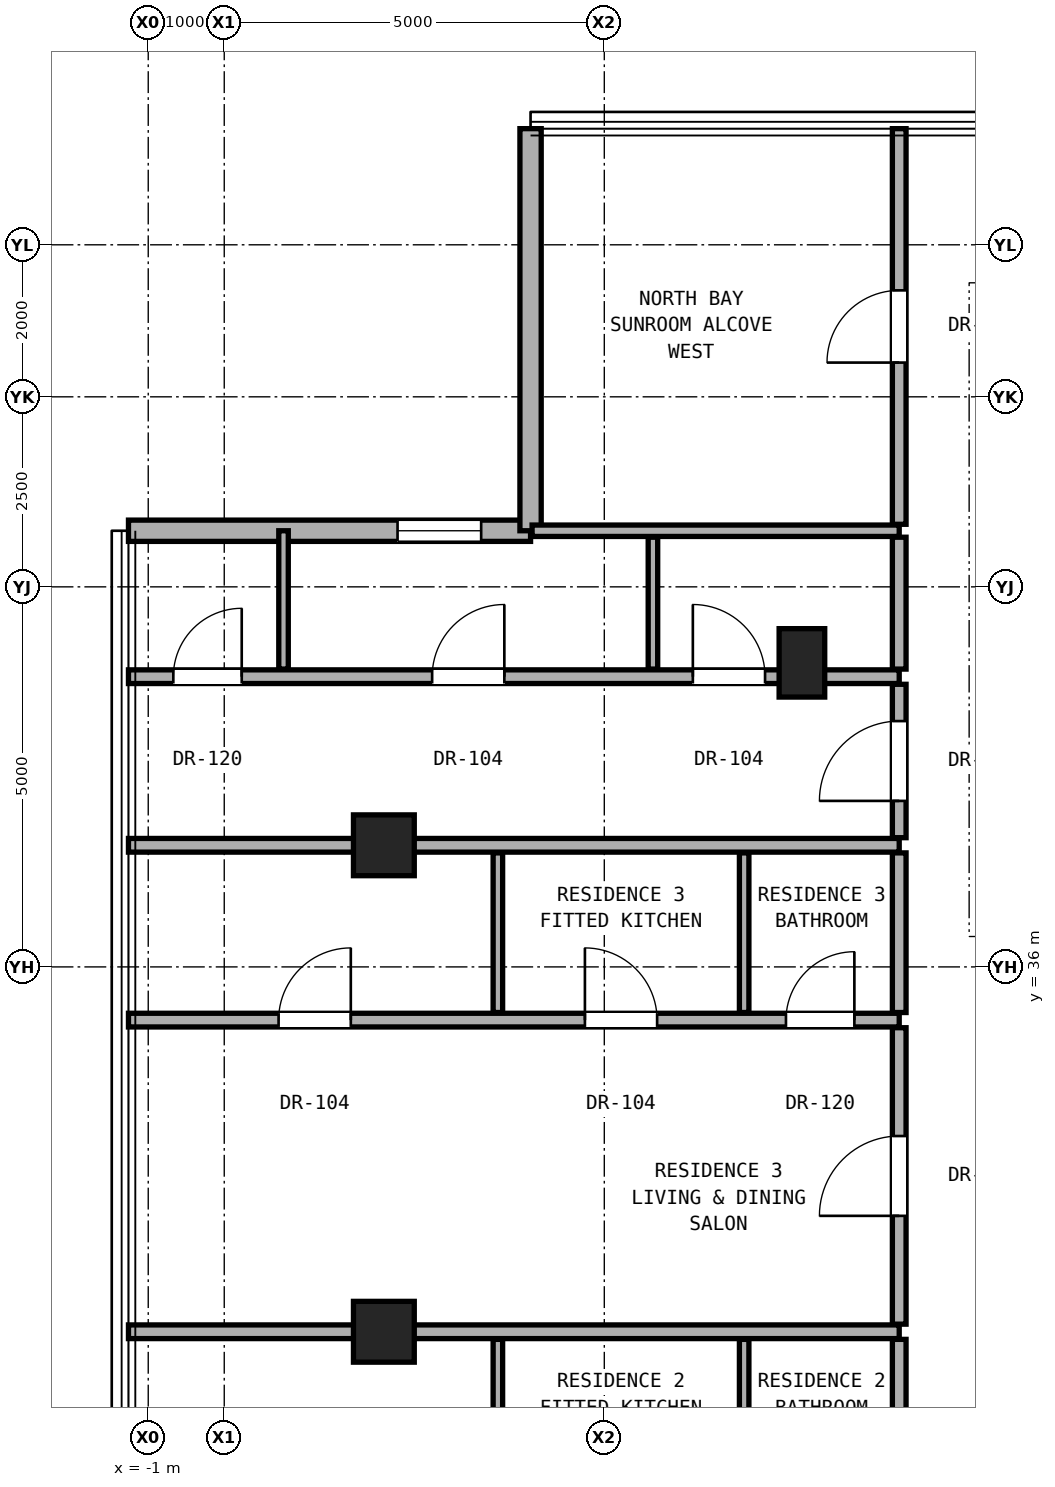
"""IFC4 building model, lengths in metres.
Left out: names, types, materials, properties, quantities, classifications, styles, units other than length and angle.
Written with IfcOpenShell. Run it as: python <this file> out.ifc"""

import sys

from ifc_helpers import new_model, si_unit, direction, frame, frame_2d, origin, origin_2d, place, context, subcontext, project, spatial, rectangle, hollow_rectangle, extrude, element, fill, save


model = new_model("IFC4")
c1 = context("Model", 3, precision=1e-05, world=origin(), true_north=direction((0.0, 1.0)))
c2 = subcontext(c1, "Body", "Model", "MODEL_VIEW")
j1 = project(units=[si_unit("LENGTHUNIT", "METRE"), si_unit("PLANEANGLEUNIT", "RADIAN")], contexts=[c1])
p1 = place(None, origin())
s1 = spatial("IfcSite", under=j1, at=p1, CompositionType="ELEMENT")
p2 = place(p1, origin())
s2 = spatial("IfcBuilding", under=s1, at=p2, CompositionType="ELEMENT")
p3 = place(p2, frame((0.0, 0.0, 239.2)))
s3 = spatial("IfcBuildingStorey", under=s2, at=p3, CompositionType="ELEMENT", Elevation=239.2)
for number, where, z_axis, x_axis in (
    (1, (2.1, 31.2, 0.0), (0.0, 0.0, 1.0), (1.0, 0.0, 0.0)),
    (2, (2.1, 37.6, 0.0), (0.0, 0.0, 1.0), (1.0, 0.0, 0.0)),
):
    element("IfcColumn", number, at=place(p3, frame(where, z_axis=z_axis, x_axis=x_axis)), inside=s3, PredefinedType="COLUMN", context=c2, shape_type="SweptSolid", body=[
        extrude(hollow_rectangle(XDim=0.8, YDim=0.8, WallThickness=0.045, at=origin_2d()), origin(), (0.0, 0.0, 1.0), 3.3),
    ])
p4 = place(p3, frame((7.6, 40.0, 0.0), z_axis=(0.0, 0.0, 1.0), x_axis=(1.0, 0.0, 0.0)))
e3 = element("IfcColumn", 3, at=p4, inside=s3, PredefinedType="PILASTER", context=c2, shape_type="SweptSolid", body=[
    extrude(rectangle(XDim=0.6, YDim=0.9, at=origin_2d()), origin(), (0.0, 0.0, 1.0), 3.3),
])
p5 = place(p3, frame((4.03, 41.738, 0.0), z_axis=(0.0, 0.0, 1.0), x_axis=(-1.0, 0.0, 0.0)))
e4 = element("IfcWall", 4, at=p5, inside=s3, PredefinedType="SOLIDWALL", context=c2, shape_type="SweptSolid", body=[
    extrude(rectangle(XDim=5.29, YDim=0.28, at=frame_2d((2.645, 0.0))), origin(), (0.0, 0.0, 1.0), 3.08),
])
p6 = place(p5, frame((0.65, 0.0, 0.85)))
e5 = element("IfcOpeningElement", 5, at=p6, cuts=e4, PredefinedType="OPENING", context=c2, shape_type="SweptSolid", body=[
    extrude(rectangle(XDim=1.1, YDim=2.0, at=frame_2d((0.55, 1.0))), frame((0.0, 0.15, 0.0), z_axis=(0.0, -1.0, 0.0), x_axis=(1.0, 0.0, 0.0)), (0.0, 0.0, 1.0), 0.3),
])
p7 = place(p3, frame((4.03, 47.028, 0.0), z_axis=(0.0, 0.0, 1.0), x_axis=(0.0, -1.0, 0.0)))
e6 = element("IfcWall", 6, at=p7, inside=s3, PredefinedType="SOLIDWALL", context=c2, shape_type="SweptSolid", body=[
    extrude(rectangle(XDim=5.29, YDim=0.28, at=frame_2d((2.645, 0.0))), origin(), (0.0, 0.0, 1.0), 3.08),
])
p8 = place(p3, frame((-1.26, 31.2, 0.0), z_axis=(0.0, 0.0, 1.0), x_axis=(1.0, 0.0, 0.0)))
e7 = element("IfcWall", 7, at=p8, inside=s3, PredefinedType="PARTITIONING", context=c2, shape_type="SweptSolid", body=[
    extrude(rectangle(XDim=10.14, YDim=0.18, at=frame_2d((5.07, 0.0))), origin(), (0.0, 0.0, 1.0), 2.319),
])
p9 = place(p3, frame((-1.26, 35.3, 0.0), z_axis=(0.0, 0.0, 1.0), x_axis=(1.0, 0.0, 0.0)))
e8 = element("IfcWall", 8, at=p9, inside=s3, PredefinedType="PARTITIONING", context=c2, shape_type="SweptSolid", body=[
    extrude(rectangle(XDim=10.14, YDim=0.18, at=frame_2d((5.07, 0.0))), origin(), (0.0, 0.0, 1.0), 2.319),
])
p10 = place(p9, frame((1.975, 0.0, 0.0)))
e9 = element("IfcOpeningElement", 9, at=p10, cuts=e8, PredefinedType="OPENING", context=c2, shape_type="SweptSolid", body=[
    extrude(rectangle(XDim=0.95, YDim=2.15, at=frame_2d((0.475, 1.075))), frame((0.0, 0.1, 0.0), z_axis=(0.0, -1.0, 0.0), x_axis=(1.0, 0.0, 0.0)), (0.0, 0.0, 1.0), 0.2),
])
p11 = place(p9, frame((6.005, 0.0, 0.0)))
e10 = element("IfcOpeningElement", 10, at=p11, cuts=e8, PredefinedType="OPENING", context=c2, shape_type="SweptSolid", body=[
    extrude(rectangle(XDim=0.95, YDim=2.15, at=frame_2d((0.475, 1.075))), frame((0.0, 0.1, 0.0), z_axis=(0.0, -1.0, 0.0), x_axis=(1.0, 0.0, 0.0)), (0.0, 0.0, 1.0), 0.2),
])
p12 = place(p9, frame((8.65, 0.0, 0.0)))
e11 = element("IfcOpeningElement", 11, at=p12, cuts=e8, PredefinedType="OPENING", context=c2, shape_type="SweptSolid", body=[
    extrude(rectangle(XDim=0.9, YDim=2.1, at=frame_2d((0.45, 1.05))), frame((0.0, 0.1, 0.0), z_axis=(0.0, -1.0, 0.0), x_axis=(1.0, 0.0, 0.0)), (0.0, 0.0, 1.0), 0.2),
])
p13 = place(p3, frame((-1.26, 37.6, 0.0), z_axis=(0.0, 0.0, 1.0), x_axis=(1.0, 0.0, 0.0)))
e12 = element("IfcWall", 12, at=p13, inside=s3, PredefinedType="PARTITIONING", context=c2, shape_type="SweptSolid", body=[
    extrude(rectangle(XDim=10.14, YDim=0.18, at=frame_2d((5.07, 0.0))), origin(), (0.0, 0.0, 1.0), 2.319),
])
p14 = place(p3, frame((-1.26, 39.818, 0.0), z_axis=(0.0, 0.0, 1.0), x_axis=(1.0, 0.0, 0.0)))
e13 = element("IfcWall", 13, at=p14, inside=s3, PredefinedType="PARTITIONING", context=c2, shape_type="SweptSolid", body=[
    extrude(rectangle(XDim=10.14, YDim=0.18, at=frame_2d((5.07, 0.0))), origin(), (0.0, 0.0, 1.0), 2.543),
])
p15 = place(p14, frame((3.995, 0.0, 0.0)))
e14 = element("IfcOpeningElement", 14, at=p15, cuts=e13, PredefinedType="OPENING", context=c2, shape_type="SweptSolid", body=[
    extrude(rectangle(XDim=0.95, YDim=2.15, at=frame_2d((0.475, 1.075))), frame((0.0, 0.1, 0.0), z_axis=(0.0, -1.0, 0.0), x_axis=(1.0, 0.0, 0.0)), (0.0, 0.0, 1.0), 0.2),
])
p16 = place(p14, frame((7.425, 0.0, 0.0)))
e15 = element("IfcOpeningElement", 15, at=p16, cuts=e13, PredefinedType="OPENING", context=c2, shape_type="SweptSolid", body=[
    extrude(rectangle(XDim=0.95, YDim=2.15, at=frame_2d((0.475, 1.075))), frame((0.0, 0.1, 0.0), z_axis=(0.0, -1.0, 0.0), x_axis=(1.0, 0.0, 0.0)), (0.0, 0.0, 1.0), 0.2),
])
p17 = place(p14, frame((0.59, 0.0, 0.0)))
e16 = element("IfcOpeningElement", 16, at=p17, cuts=e13, PredefinedType="OPENING", context=c2, shape_type="SweptSolid", body=[
    extrude(rectangle(XDim=0.9, YDim=2.1, at=frame_2d((0.45, 1.05))), frame((0.0, 0.1, 0.0), z_axis=(0.0, -1.0, 0.0), x_axis=(1.0, 0.0, 0.0)), (0.0, 0.0, 1.0), 0.2),
])
p18 = place(p3, frame((4.05, 41.738, 0.0), z_axis=(0.0, 0.0, 1.0), x_axis=(1.0, 0.0, 0.0)))
e17 = element("IfcWall", 17, at=p18, inside=s3, PredefinedType="PARTITIONING", context=c2, shape_type="SweptSolid", body=[
    extrude(rectangle(XDim=4.83, YDim=0.15, at=frame_2d((2.415, 0.0))), origin(), (0.0, 0.0, 1.0), 3.1),
])
p19 = place(p3, frame((0.78, 39.918, 0.0), z_axis=(0.0, 0.0, 1.0), x_axis=(0.0, 1.0, 0.0)))
e18 = element("IfcWall", 18, at=p19, inside=s3, PredefinedType="PARTITIONING", context=c2, shape_type="SweptSolid", body=[
    extrude(rectangle(XDim=1.82, YDim=0.125, at=frame_2d((0.91, 0.0))), origin(), (0.0, 0.0, 1.0), 3.1),
])
p20 = place(p3, frame((3.6, 29.0, 0.0), z_axis=(0.0, 0.0, 1.0), x_axis=(0.0, 1.0, 0.0)))
e19 = element("IfcWall", 19, at=p20, inside=s3, PredefinedType="PARTITIONING", context=c2, shape_type="SweptSolid", body=[
    extrude(rectangle(XDim=2.1, YDim=0.125, at=frame_2d((1.05, 0.0))), origin(), (0.0, 0.0, 1.0), 2.396),
])
p21 = place(p3, frame((3.6, 35.4, 0.0), z_axis=(0.0, 0.0, 1.0), x_axis=(0.0, 1.0, 0.0)))
e20 = element("IfcWall", 20, at=p21, inside=s3, PredefinedType="PARTITIONING", context=c2, shape_type="SweptSolid", body=[
    extrude(rectangle(XDim=2.1, YDim=0.125, at=frame_2d((1.05, 0.0))), origin(), (0.0, 0.0, 1.0), 2.492),
])
p22 = place(p3, frame((5.64, 39.918, 0.0), z_axis=(0.0, 0.0, 1.0), x_axis=(0.0, 1.0, 0.0)))
e21 = element("IfcWall", 21, at=p22, inside=s3, PredefinedType="PARTITIONING", context=c2, shape_type="SweptSolid", body=[
    extrude(rectangle(XDim=1.735, YDim=0.125, at=frame_2d((0.868, 0.0))), origin(), (0.0, 0.0, 1.0), 3.1),
])
p23 = place(p3, frame((6.84, 29.0, 0.0), z_axis=(0.0, 0.0, 1.0), x_axis=(0.0, 1.0, 0.0)))
e22 = element("IfcWall", 22, at=p23, inside=s3, PredefinedType="PARTITIONING", context=c2, shape_type="SweptSolid", body=[
    extrude(rectangle(XDim=2.1, YDim=0.125, at=frame_2d((1.05, 0.0))), origin(), (0.0, 0.0, 1.0), 2.396),
])
p24 = place(p3, frame((6.84, 35.4, 0.0), z_axis=(0.0, 0.0, 1.0), x_axis=(0.0, 1.0, 0.0)))
e23 = element("IfcWall", 23, at=p24, inside=s3, PredefinedType="PARTITIONING", context=c2, shape_type="SweptSolid", body=[
    extrude(rectangle(XDim=2.1, YDim=0.125, at=frame_2d((1.05, 0.0))), origin(), (0.0, 0.0, 1.0), 2.492),
])
p25 = place(p3, frame((8.88, 29.0, 0.0), z_axis=(0.0, 0.0, 1.0), x_axis=(0.0, 1.0, 0.0)))
e24 = element("IfcWall", 24, at=p25, inside=s3, PredefinedType="PARTITIONING", context=c2, shape_type="SweptSolid", body=[
    extrude(rectangle(XDim=2.1, YDim=0.18, at=frame_2d((1.05, 0.0))), origin(), (0.0, 0.0, 1.0), 2.396),
])
p26 = place(p3, frame((8.88, 31.3, 0.0), z_axis=(0.0, 0.0, 1.0), x_axis=(0.0, 1.0, 0.0)))
e25 = element("IfcWall", 25, at=p26, inside=s3, PredefinedType="PARTITIONING", context=c2, shape_type="SweptSolid", body=[
    extrude(rectangle(XDim=3.9, YDim=0.18, at=frame_2d((1.95, 0.0))), origin(), (0.0, 0.0, 1.0), 2.396),
])
p27 = place(p26, frame((1.425, 0.0, 0.0)))
e26 = element("IfcOpeningElement", 26, at=p27, cuts=e25, PredefinedType="OPENING", context=c2, shape_type="SweptSolid", body=[
    extrude(rectangle(XDim=1.05, YDim=2.2, at=frame_2d((0.525, 1.1))), frame((0.0, 0.1, 0.0), z_axis=(0.0, -1.0, 0.0), x_axis=(1.0, 0.0, 0.0)), (0.0, 0.0, 1.0), 0.2),
])
p28 = place(p3, frame((8.88, 35.4, 0.0), z_axis=(0.0, 0.0, 1.0), x_axis=(0.0, 1.0, 0.0)))
e27 = element("IfcWall", 27, at=p28, inside=s3, PredefinedType="PARTITIONING", context=c2, shape_type="SweptSolid", body=[
    extrude(rectangle(XDim=2.1, YDim=0.18, at=frame_2d((1.05, 0.0))), origin(), (0.0, 0.0, 1.0), 2.492),
])
p29 = place(p3, frame((8.88, 37.7, 0.0), z_axis=(0.0, 0.0, 1.0), x_axis=(0.0, 1.0, 0.0)))
e28 = element("IfcWall", 28, at=p29, inside=s3, PredefinedType="PARTITIONING", context=c2, shape_type="SweptSolid", body=[
    extrude(rectangle(XDim=2.018, YDim=0.18, at=frame_2d((1.009, 0.0))), origin(), (0.0, 0.0, 1.0), 2.492),
])
p30 = place(p29, frame((0.484, 0.0, 0.0)))
e29 = element("IfcOpeningElement", 29, at=p30, cuts=e28, PredefinedType="OPENING", context=c2, shape_type="SweptSolid", body=[
    extrude(rectangle(XDim=1.05, YDim=2.2, at=frame_2d((0.525, 1.1))), frame((0.0, 0.1, 0.0), z_axis=(0.0, -1.0, 0.0), x_axis=(1.0, 0.0, 0.0)), (0.0, 0.0, 1.0), 0.2),
])
p31 = place(p3, frame((8.88, 39.918, 0.0), z_axis=(0.0, 0.0, 1.0), x_axis=(0.0, 1.0, 0.0)))
e30 = element("IfcWall", 30, at=p31, inside=s3, PredefinedType="PARTITIONING", context=c2, shape_type="SweptSolid", body=[
    extrude(rectangle(XDim=1.735, YDim=0.18, at=frame_2d((0.868, 0.0))), origin(), (0.0, 0.0, 1.0), 3.1),
])
p32 = place(p3, frame((8.88, 41.823, 0.0), z_axis=(0.0, 0.0, 1.0), x_axis=(0.0, 1.0, 0.0)))
e31 = element("IfcWall", 31, at=p32, inside=s3, PredefinedType="PARTITIONING", context=c2, shape_type="SweptSolid", body=[
    extrude(rectangle(XDim=5.205, YDim=0.18, at=frame_2d((2.603, 0.0))), origin(), (0.0, 0.0, 1.0), 3.1),
])
p33 = place(p32, frame((2.127, 0.0, 0.0)))
e32 = element("IfcOpeningElement", 32, at=p33, cuts=e31, PredefinedType="OPENING", context=c2, shape_type="SweptSolid", body=[
    extrude(rectangle(XDim=0.95, YDim=2.15, at=frame_2d((0.475, 1.075))), frame((0.0, 0.1, 0.0), z_axis=(0.0, -1.0, 0.0), x_axis=(1.0, 0.0, 0.0)), (0.0, 0.0, 1.0), 0.2),
])
p34 = place(p6, origin())
e33 = element("IfcWindow", 33, at=p34, inside=s3, PartitioningType="SINGLE_PANEL", PredefinedType="WINDOW", context=c2, shape_type="SweptSolid", body=[
    extrude(rectangle(XDim=1.1, YDim=2.0, at=frame_2d((0.55, 1.0))), frame((0.0, 0.03, 0.0), z_axis=(0.0, -1.0, 0.0), x_axis=(1.0, 0.0, 0.0)), (0.0, 0.0, 1.0), 0.06),
])
fill(e5, e33)
p35 = place(p27, origin())
e34 = element("IfcDoor", 34, at=p35, inside=s3, OperationType="SINGLE_SWING_LEFT", PredefinedType="DOOR", context=c2, shape_type="SweptSolid", body=[
    extrude(rectangle(XDim=1.05, YDim=2.2, at=frame_2d((0.525, 1.1))), frame((0.0, 0.025, 0.0), z_axis=(0.0, -1.0, 0.0), x_axis=(1.0, 0.0, 0.0)), (0.0, 0.0, 1.0), 0.05),
])
fill(e26, e34)
p36 = place(p10, origin())
e35 = element("IfcDoor", 35, at=p36, inside=s3, OperationType="SINGLE_SWING_RIGHT", PredefinedType="DOOR", context=c2, shape_type="SweptSolid", body=[
    extrude(rectangle(XDim=0.95, YDim=2.15, at=frame_2d((0.475, 1.075))), frame((0.0, 0.025, 0.0), z_axis=(0.0, -1.0, 0.0), x_axis=(1.0, 0.0, 0.0)), (0.0, 0.0, 1.0), 0.05),
])
fill(e9, e35)
p37 = place(p11, origin())
e36 = element("IfcDoor", 36, at=p37, inside=s3, OperationType="SINGLE_SWING_LEFT", PredefinedType="DOOR", context=c2, shape_type="SweptSolid", body=[
    extrude(rectangle(XDim=0.95, YDim=2.15, at=frame_2d((0.475, 1.075))), frame((0.0, 0.025, 0.0), z_axis=(0.0, -1.0, 0.0), x_axis=(1.0, 0.0, 0.0)), (0.0, 0.0, 1.0), 0.05),
])
fill(e10, e36)
p38 = place(p12, origin())
e37 = element("IfcDoor", 37, at=p38, inside=s3, OperationType="SINGLE_SWING_RIGHT", PredefinedType="DOOR", context=c2, shape_type="SweptSolid", body=[
    extrude(rectangle(XDim=0.9, YDim=2.1, at=frame_2d((0.45, 1.05))), frame((0.0, 0.025, 0.0), z_axis=(0.0, -1.0, 0.0), x_axis=(1.0, 0.0, 0.0)), (0.0, 0.0, 1.0), 0.05),
])
fill(e11, e37)
p39 = place(p30, origin())
e38 = element("IfcDoor", 38, at=p39, inside=s3, OperationType="SINGLE_SWING_LEFT", PredefinedType="DOOR", context=c2, shape_type="SweptSolid", body=[
    extrude(rectangle(XDim=1.05, YDim=2.2, at=frame_2d((0.525, 1.1))), frame((0.0, 0.025, 0.0), z_axis=(0.0, -1.0, 0.0), x_axis=(1.0, 0.0, 0.0)), (0.0, 0.0, 1.0), 0.05),
])
fill(e29, e38)
p40 = place(p15, origin())
e39 = element("IfcDoor", 39, at=p40, inside=s3, OperationType="SINGLE_SWING_RIGHT", PredefinedType="DOOR", context=c2, shape_type="SweptSolid", body=[
    extrude(rectangle(XDim=0.95, YDim=2.15, at=frame_2d((0.475, 1.075))), frame((0.0, 0.025, 0.0), z_axis=(0.0, -1.0, 0.0), x_axis=(1.0, 0.0, 0.0)), (0.0, 0.0, 1.0), 0.05),
])
fill(e14, e39)
p41 = place(p16, origin())
e40 = element("IfcDoor", 40, at=p41, inside=s3, OperationType="SINGLE_SWING_LEFT", PredefinedType="DOOR", context=c2, shape_type="SweptSolid", body=[
    extrude(rectangle(XDim=0.95, YDim=2.15, at=frame_2d((0.475, 1.075))), frame((0.0, 0.025, 0.0), z_axis=(0.0, -1.0, 0.0), x_axis=(1.0, 0.0, 0.0)), (0.0, 0.0, 1.0), 0.05),
])
fill(e15, e40)
p42 = place(p17, origin())
e41 = element("IfcDoor", 41, at=p42, inside=s3, OperationType="SINGLE_SWING_RIGHT", PredefinedType="DOOR", context=c2, shape_type="SweptSolid", body=[
    extrude(rectangle(XDim=0.9, YDim=2.1, at=frame_2d((0.45, 1.05))), frame((0.0, 0.025, 0.0), z_axis=(0.0, -1.0, 0.0), x_axis=(1.0, 0.0, 0.0)), (0.0, 0.0, 1.0), 0.05),
])
fill(e16, e41)
p43 = place(p33, origin())
e42 = element("IfcDoor", 42, at=p43, inside=s3, OperationType="SINGLE_SWING_LEFT", PredefinedType="DOOR", context=c2, shape_type="SweptSolid", body=[
    extrude(rectangle(XDim=0.95, YDim=2.15, at=frame_2d((0.475, 1.075))), frame((0.0, 0.025, 0.0), z_axis=(0.0, -1.0, 0.0), x_axis=(1.0, 0.0, 0.0)), (0.0, 0.0, 1.0), 0.05),
])
fill(e32, e42)
save(model, sys.argv[1])
